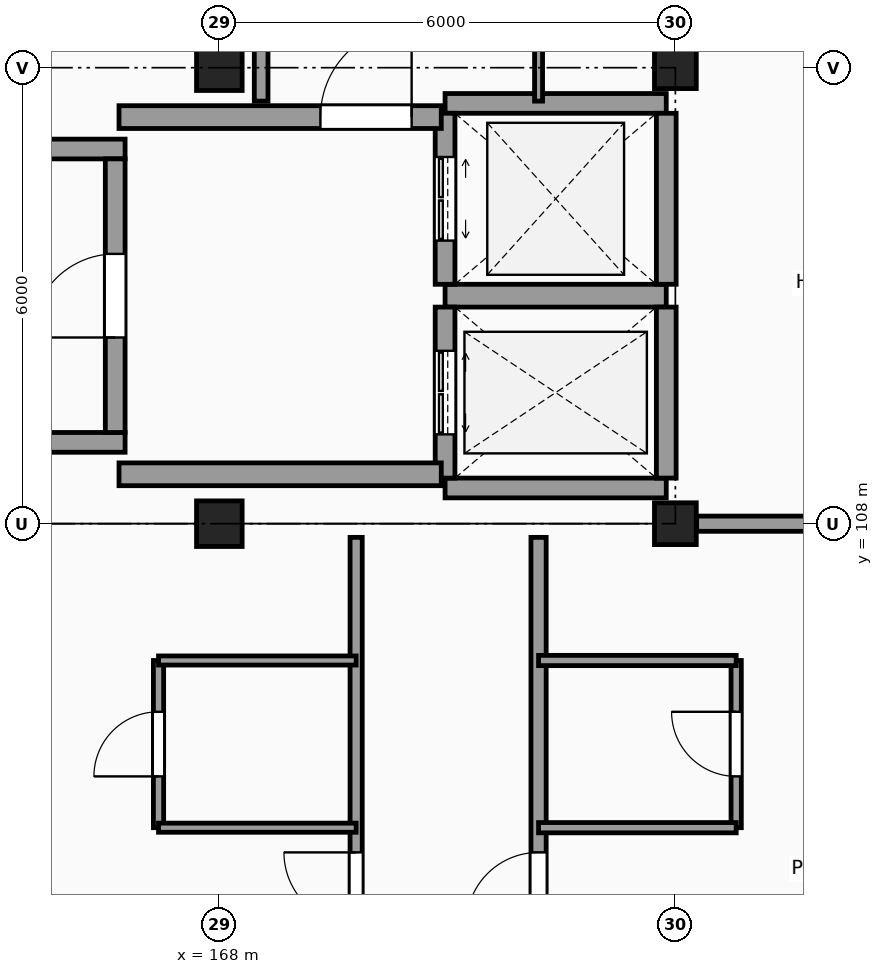
"""IFC4 building model, lengths in metres.
Left out: names, types, materials, properties, quantities, classifications, styles, units other than length and angle.
Written with IfcOpenShell. Run it as: python <this file> out.ifc"""

import sys

from ifc_helpers import new_model, si_unit, direction, frame, frame_2d, origin, origin_2d, place, context, subcontext, project, spatial, rectangle, extrude, element, fill, save


model = new_model("IFC4")
c1 = context("Model", 3, precision=1e-05, world=origin(), true_north=direction((0.0, 1.0)))
c2 = subcontext(c1, "Body", "Model", "MODEL_VIEW")
j1 = project(units=[si_unit("LENGTHUNIT", "METRE"), si_unit("PLANEANGLEUNIT", "RADIAN")], contexts=[c1])
p1 = place(None, origin())
s1 = spatial("IfcSite", under=j1, at=p1, CompositionType="ELEMENT")
p2 = place(p1, origin())
s2 = spatial("IfcBuilding", under=s1, at=p2, CompositionType="ELEMENT")
p3 = place(p2, frame((0.0, 0.0, 28.2)))
s3 = spatial("IfcBuildingStorey", under=s2, at=p3, CompositionType="ELEMENT", Elevation=28.2)
for number, where, z_axis, x_axis in (
    (1, (168.0, 108.0, 0.0), (0.0, 0.0, 1.0), (1.0, 0.0, 0.0)),
    (2, (168.0, 114.0, 0.0), (0.0, 0.0, 1.0), (1.0, 0.0, 0.0)),
):
    element("IfcColumn", number, at=place(p3, frame(where, z_axis=z_axis, x_axis=x_axis)), inside=s3, PredefinedType="COLUMN", context=c2, shape_type="SweptSolid", body=[
        extrude(rectangle(XDim=0.6, YDim=0.6, at=origin_2d()), origin(), (0.0, 0.0, 1.0), 3.3),
    ])
for number, where, z_axis, x_axis in (
    (3, (174.0, 108.0, 0.0), (0.0, 0.0, 1.0), (1.0, 0.0, 0.0)),
    (4, (174.0, 114.0, 0.0), (0.0, 0.0, 1.0), (1.0, 0.0, 0.0)),
):
    element("IfcColumn", number, at=place(p3, frame(where, z_axis=z_axis, x_axis=x_axis)), inside=s3, PredefinedType="COLUMN", context=c2, shape_type="SweptSolid", body=[
        extrude(rectangle(XDim=0.55, YDim=0.55, at=origin_2d()), origin(), (0.0, 0.0, 1.0), 3.3),
    ])
for number, where, z_axis, x_axis in (
    (5, (156.04, 109.07, 0.0), (0.0, 0.0, 1.0), (1.0, 0.0, 0.0)),
    (6, (156.04, 112.93, 0.0), (0.0, 0.0, 1.0), (1.0, 0.0, 0.0)),
):
    element("IfcWall", number, at=place(p3, frame(where, z_axis=z_axis, x_axis=x_axis)), inside=s3, PredefinedType="SHEAR", context=c2, shape_type="SweptSolid", body=[
        extrude(rectangle(XDim=10.72, YDim=0.26, at=frame_2d((5.36, 0.0))), origin(), (0.0, 0.0, 1.0), 3.3),
    ])
p4 = place(p3, frame((166.63, 109.2, 0.0), z_axis=(0.0, 0.0, 1.0), x_axis=(0.0, 1.0, 0.0)))
e7 = element("IfcWall", 7, at=p4, inside=s3, PredefinedType="SHEAR", context=c2, shape_type="SweptSolid", body=[
    extrude(rectangle(XDim=3.6, YDim=0.26, at=frame_2d((1.8, 0.0))), origin(), (0.0, 0.0, 1.0), 3.3),
])
p5 = place(p4, frame((1.25, 0.0, 0.0)))
e8 = element("IfcOpeningElement", 8, at=p5, cuts=e7, PredefinedType="OPENING", context=c2, shape_type="SweptSolid", body=[
    extrude(rectangle(XDim=1.1, YDim=2.15, at=frame_2d((0.55, 1.075))), frame((0.0, 0.14, 0.0), z_axis=(0.0, -1.0, 0.0), x_axis=(1.0, 0.0, 0.0)), (0.0, 0.0, 1.0), 0.28),
])
p6 = place(p3, frame((170.97, 108.47, 0.0), z_axis=(0.0, 0.0, 1.0), x_axis=(1.0, 0.0, 0.0)))
e9 = element("IfcWall", 9, at=p6, inside=s3, PredefinedType="SHEAR", context=c2, shape_type="SweptSolid", body=[
    extrude(rectangle(XDim=2.91, YDim=0.26, at=frame_2d((1.455, 0.0))), origin(), (0.0, 0.0, 1.0), 3.3),
])
p7 = place(p3, frame((170.97, 111.0, 0.0), z_axis=(0.0, 0.0, 1.0), x_axis=(1.0, 0.0, 0.0)))
e10 = element("IfcWall", 10, at=p7, inside=s3, PredefinedType="SHEAR", context=c2, shape_type="SweptSolid", body=[
    extrude(rectangle(XDim=2.91, YDim=0.3, at=frame_2d((1.455, 0.0))), origin(), (0.0, 0.0, 1.0), 3.3),
])
p8 = place(p3, frame((173.88, 108.6, 0.0), z_axis=(0.0, 0.0, 1.0), x_axis=(0.0, 1.0, 0.0)))
e11 = element("IfcWall", 11, at=p8, inside=s3, PredefinedType="SHEAR", context=c2, shape_type="SweptSolid", body=[
    extrude(rectangle(XDim=2.25, YDim=0.26, at=frame_2d((1.125, 0.0))), origin(), (0.0, 0.0, 1.0), 3.3),
])
p9 = place(p3, frame((170.97, 108.6, 0.0), z_axis=(0.0, 0.0, 1.0), x_axis=(0.0, 1.0, 0.0)))
e12 = element("IfcWall", 12, at=p9, inside=s3, PredefinedType="SHEAR", context=c2, shape_type="SweptSolid", body=[
    extrude(rectangle(XDim=2.25, YDim=0.26, at=frame_2d((1.125, 0.0))), origin(), (0.0, 0.0, 1.0), 3.3),
])
p10 = place(p9, frame((0.575, 0.0, 0.0)))
e13 = element("IfcOpeningElement", 13, at=p10, cuts=e12, PredefinedType="OPENING", context=c2, shape_type="SweptSolid", body=[
    extrude(rectangle(XDim=1.1, YDim=2.2, at=frame_2d((0.55, 1.1))), frame((0.0, 0.14, 0.0), z_axis=(0.0, -1.0, 0.0), x_axis=(1.0, 0.0, 0.0)), (0.0, 0.0, 1.0), 0.28),
])
p11 = place(p3, frame((170.97, 113.53, 0.0), z_axis=(0.0, 0.0, 1.0), x_axis=(1.0, 0.0, 0.0)))
e14 = element("IfcWall", 14, at=p11, inside=s3, PredefinedType="SHEAR", context=c2, shape_type="SweptSolid", body=[
    extrude(rectangle(XDim=2.91, YDim=0.26, at=frame_2d((1.455, 0.0))), origin(), (0.0, 0.0, 1.0), 3.3),
])
p12 = place(p3, frame((173.88, 111.15, 0.0), z_axis=(0.0, 0.0, 1.0), x_axis=(0.0, 1.0, 0.0)))
e15 = element("IfcWall", 15, at=p12, inside=s3, PredefinedType="SHEAR", context=c2, shape_type="SweptSolid", body=[
    extrude(rectangle(XDim=2.25, YDim=0.26, at=frame_2d((1.125, 0.0))), origin(), (0.0, 0.0, 1.0), 3.3),
])
p13 = place(p3, frame((170.97, 111.15, 0.0), z_axis=(0.0, 0.0, 1.0), x_axis=(0.0, 1.0, 0.0)))
e16 = element("IfcWall", 16, at=p13, inside=s3, PredefinedType="SHEAR", context=c2, shape_type="SweptSolid", body=[
    extrude(rectangle(XDim=2.25, YDim=0.26, at=frame_2d((1.125, 0.0))), origin(), (0.0, 0.0, 1.0), 3.3),
])
p14 = place(p13, frame((0.575, 0.0, 0.0)))
e17 = element("IfcOpeningElement", 17, at=p14, cuts=e16, PredefinedType="OPENING", context=c2, shape_type="SweptSolid", body=[
    extrude(rectangle(XDim=1.1, YDim=2.2, at=frame_2d((0.55, 1.1))), frame((0.0, 0.14, 0.0), z_axis=(0.0, -1.0, 0.0), x_axis=(1.0, 0.0, 0.0)), (0.0, 0.0, 1.0), 0.28),
])
p15 = place(p3, frame((166.68, 113.35, 0.0), z_axis=(0.0, 0.0, 1.0), x_axis=(1.0, 0.0, 0.0)))
e18 = element("IfcWall", 18, at=p15, inside=s3, PredefinedType="SHEAR", context=c2, shape_type="SweptSolid", body=[
    extrude(rectangle(XDim=4.24, YDim=0.3, at=frame_2d((2.12, 0.0))), origin(), (0.0, 0.0, 1.0), 3.3),
])
p16 = place(p15, frame((2.65, 0.0, 0.0)))
e19 = element("IfcOpeningElement", 19, at=p16, cuts=e18, PredefinedType="OPENING", context=c2, shape_type="SweptSolid", body=[
    extrude(rectangle(XDim=1.2, YDim=2.2, at=frame_2d((0.6, 1.1))), frame((0.0, 0.16, 0.0), z_axis=(0.0, -1.0, 0.0), x_axis=(1.0, 0.0, 0.0)), (0.0, 0.0, 1.0), 0.32),
])
p17 = place(p3, frame((166.68, 108.65, 0.0), z_axis=(0.0, 0.0, 1.0), x_axis=(1.0, 0.0, 0.0)))
e20 = element("IfcWall", 20, at=p17, inside=s3, PredefinedType="SHEAR", context=c2, shape_type="SweptSolid", body=[
    extrude(rectangle(XDim=4.24, YDim=0.3, at=frame_2d((2.12, 0.0))), origin(), (0.0, 0.0, 1.0), 3.3),
])
p18 = place(p3, frame((167.2, 104.0, 0.0), z_axis=(0.0, 0.0, 1.0), x_axis=(0.0, 1.0, 0.0)))
e21 = element("IfcWall", 21, at=p18, inside=s3, PredefinedType="PARTITIONING", context=c2, shape_type="SweptSolid", body=[
    extrude(rectangle(XDim=2.2, YDim=0.135, at=frame_2d((1.1, 0.0))), origin(), (0.0, 0.0, 1.0), 3.08),
])
p19 = place(p18, frame((0.675, 0.0, 0.0)))
e22 = element("IfcOpeningElement", 22, at=p19, cuts=e21, PredefinedType="OPENING", context=c2, shape_type="SweptSolid", body=[
    extrude(rectangle(XDim=0.85, YDim=2.1, at=frame_2d((0.425, 1.05))), frame((0.0, 0.078, 0.0), z_axis=(0.0, -1.0, 0.0), x_axis=(1.0, 0.0, 0.0)), (0.0, 0.0, 1.0), 0.155),
])
p20 = place(p3, frame((168.55, 113.56, 0.0), z_axis=(0.0, 0.0, 1.0), x_axis=(0.0, 1.0, 0.0)))
e23 = element("IfcWall", 23, at=p20, inside=s3, PredefinedType="PARTITIONING", context=c2, shape_type="SweptSolid", body=[
    extrude(rectangle(XDim=2.24, YDim=0.18, at=frame_2d((1.12, 0.0))), origin(), (0.0, 0.0, 1.0), 3.08),
])
p21 = place(p3, frame((169.8, 42.275, 0.0), z_axis=(0.0, 0.0, 1.0), x_axis=(0.0, 1.0, 0.0)))
e24 = element("IfcWall", 24, at=p21, inside=s3, PredefinedType="PARTITIONING", context=c2, shape_type="SweptSolid", body=[
    extrude(rectangle(XDim=65.545, YDim=0.16, at=frame_2d((32.772, 0.0))), origin(), (0.0, 0.0, 1.0), 3.08),
])
p22 = place(p21, frame((50.125, 0.0, 0.0)))
e25 = element("IfcOpeningElement", 25, at=p22, cuts=e24, PredefinedType="OPENING", context=c2, shape_type="SweptSolid", body=[
    extrude(rectangle(XDim=1.2, YDim=2.2, at=frame_2d((0.6, 1.1))), frame((0.0, 0.09, 0.0), z_axis=(0.0, -1.0, 0.0), x_axis=(1.0, 0.0, 0.0)), (0.0, 0.0, 1.0), 0.18),
])
p23 = place(p21, frame((0.4, 0.0, 0.0)))
e26 = element("IfcOpeningElement", 26, at=p23, cuts=e24, PredefinedType="OPENING", context=c2, shape_type="SweptSolid", body=[
    extrude(rectangle(XDim=0.95, YDim=2.1, at=frame_2d((0.475, 1.05))), frame((0.0, 0.09, 0.0), z_axis=(0.0, -1.0, 0.0), x_axis=(1.0, 0.0, 0.0)), (0.0, 0.0, 1.0), 0.18),
])
p24 = place(p21, frame((6.45, 0.0, 0.0)))
e27 = element("IfcOpeningElement", 27, at=p24, cuts=e24, PredefinedType="OPENING", context=c2, shape_type="SweptSolid", body=[
    extrude(rectangle(XDim=0.95, YDim=2.1, at=frame_2d((0.475, 1.05))), frame((0.0, 0.09, 0.0), z_axis=(0.0, -1.0, 0.0), x_axis=(1.0, 0.0, 0.0)), (0.0, 0.0, 1.0), 0.18),
])
p25 = place(p21, frame((12.45, 0.0, 0.0)))
e28 = element("IfcOpeningElement", 28, at=p25, cuts=e24, PredefinedType="OPENING", context=c2, shape_type="SweptSolid", body=[
    extrude(rectangle(XDim=0.95, YDim=2.1, at=frame_2d((0.475, 1.05))), frame((0.0, 0.09, 0.0), z_axis=(0.0, -1.0, 0.0), x_axis=(1.0, 0.0, 0.0)), (0.0, 0.0, 1.0), 0.18),
])
p26 = place(p21, frame((18.45, 0.0, 0.0)))
e29 = element("IfcOpeningElement", 29, at=p26, cuts=e24, PredefinedType="OPENING", context=c2, shape_type="SweptSolid", body=[
    extrude(rectangle(XDim=0.95, YDim=2.1, at=frame_2d((0.475, 1.05))), frame((0.0, 0.09, 0.0), z_axis=(0.0, -1.0, 0.0), x_axis=(1.0, 0.0, 0.0)), (0.0, 0.0, 1.0), 0.18),
])
p27 = place(p21, frame((24.45, 0.0, 0.0)))
e30 = element("IfcOpeningElement", 30, at=p27, cuts=e24, PredefinedType="OPENING", context=c2, shape_type="SweptSolid", body=[
    extrude(rectangle(XDim=0.95, YDim=2.1, at=frame_2d((0.475, 1.05))), frame((0.0, 0.09, 0.0), z_axis=(0.0, -1.0, 0.0), x_axis=(1.0, 0.0, 0.0)), (0.0, 0.0, 1.0), 0.18),
])
p28 = place(p21, frame((30.45, 0.0, 0.0)))
e31 = element("IfcOpeningElement", 31, at=p28, cuts=e24, PredefinedType="OPENING", context=c2, shape_type="SweptSolid", body=[
    extrude(rectangle(XDim=0.95, YDim=2.1, at=frame_2d((0.475, 1.05))), frame((0.0, 0.09, 0.0), z_axis=(0.0, -1.0, 0.0), x_axis=(1.0, 0.0, 0.0)), (0.0, 0.0, 1.0), 0.18),
])
p29 = place(p21, frame((54.45, 0.0, 0.0)))
e32 = element("IfcOpeningElement", 32, at=p29, cuts=e24, PredefinedType="OPENING", context=c2, shape_type="SweptSolid", body=[
    extrude(rectangle(XDim=0.95, YDim=2.1, at=frame_2d((0.475, 1.05))), frame((0.0, 0.09, 0.0), z_axis=(0.0, -1.0, 0.0), x_axis=(1.0, 0.0, 0.0)), (0.0, 0.0, 1.0), 0.18),
])
p30 = place(p21, frame((60.45, 0.0, 0.0)))
e33 = element("IfcOpeningElement", 33, at=p30, cuts=e24, PredefinedType="OPENING", context=c2, shape_type="SweptSolid", body=[
    extrude(rectangle(XDim=0.95, YDim=2.1, at=frame_2d((0.475, 1.05))), frame((0.0, 0.09, 0.0), z_axis=(0.0, -1.0, 0.0), x_axis=(1.0, 0.0, 0.0)), (0.0, 0.0, 1.0), 0.18),
])
p31 = place(p3, frame((172.2, 42.275, 0.0), z_axis=(0.0, 0.0, 1.0), x_axis=(0.0, 1.0, 0.0)))
e34 = element("IfcWall", 34, at=p31, inside=s3, PredefinedType="PARTITIONING", context=c2, shape_type="SweptSolid", body=[
    extrude(rectangle(XDim=65.545, YDim=0.2, at=frame_2d((32.772, 0.0))), origin(), (0.0, 0.0, 1.0), 3.08),
])
p32 = place(p31, frame((0.4, 0.0, 0.0)))
e35 = element("IfcOpeningElement", 35, at=p32, cuts=e34, PredefinedType="OPENING", context=c2, shape_type="SweptSolid", body=[
    extrude(rectangle(XDim=0.95, YDim=2.1, at=frame_2d((0.475, 1.05))), frame((0.0, 0.11, 0.0), z_axis=(0.0, -1.0, 0.0), x_axis=(1.0, 0.0, 0.0)), (0.0, 0.0, 1.0), 0.22),
])
p33 = place(p31, frame((4.85, 0.0, 0.0)))
e36 = element("IfcOpeningElement", 36, at=p33, cuts=e34, PredefinedType="OPENING", context=c2, shape_type="SweptSolid", body=[
    extrude(rectangle(XDim=0.95, YDim=2.1, at=frame_2d((0.475, 1.05))), frame((0.0, 0.11, 0.0), z_axis=(0.0, -1.0, 0.0), x_axis=(1.0, 0.0, 0.0)), (0.0, 0.0, 1.0), 0.22),
])
p34 = place(p31, frame((9.35, 0.0, 0.0)))
e37 = element("IfcOpeningElement", 37, at=p34, cuts=e34, PredefinedType="OPENING", context=c2, shape_type="SweptSolid", body=[
    extrude(rectangle(XDim=0.95, YDim=2.1, at=frame_2d((0.475, 1.05))), frame((0.0, 0.11, 0.0), z_axis=(0.0, -1.0, 0.0), x_axis=(1.0, 0.0, 0.0)), (0.0, 0.0, 1.0), 0.22),
])
p35 = place(p31, frame((18.45, 0.0, 0.0)))
e38 = element("IfcOpeningElement", 38, at=p35, cuts=e34, PredefinedType="OPENING", context=c2, shape_type="SweptSolid", body=[
    extrude(rectangle(XDim=0.95, YDim=2.1, at=frame_2d((0.475, 1.05))), frame((0.0, 0.11, 0.0), z_axis=(0.0, -1.0, 0.0), x_axis=(1.0, 0.0, 0.0)), (0.0, 0.0, 1.0), 0.22),
])
p36 = place(p31, frame((22.85, 0.0, 0.0)))
e39 = element("IfcOpeningElement", 39, at=p36, cuts=e34, PredefinedType="OPENING", context=c2, shape_type="SweptSolid", body=[
    extrude(rectangle(XDim=0.95, YDim=2.1, at=frame_2d((0.475, 1.05))), frame((0.0, 0.11, 0.0), z_axis=(0.0, -1.0, 0.0), x_axis=(1.0, 0.0, 0.0)), (0.0, 0.0, 1.0), 0.22),
])
p37 = place(p31, frame((30.05, 0.0, 0.0)))
e40 = element("IfcOpeningElement", 40, at=p37, cuts=e34, PredefinedType="OPENING", context=c2, shape_type="SweptSolid", body=[
    extrude(rectangle(XDim=0.95, YDim=2.1, at=frame_2d((0.475, 1.05))), frame((0.0, 0.11, 0.0), z_axis=(0.0, -1.0, 0.0), x_axis=(1.0, 0.0, 0.0)), (0.0, 0.0, 1.0), 0.22),
])
p38 = place(p31, frame((38.3, 0.0, 0.0)))
e41 = element("IfcOpeningElement", 41, at=p38, cuts=e34, PredefinedType="OPENING", context=c2, shape_type="SweptSolid", body=[
    extrude(rectangle(XDim=0.95, YDim=2.1, at=frame_2d((0.475, 1.05))), frame((0.0, 0.11, 0.0), z_axis=(0.0, -1.0, 0.0), x_axis=(1.0, 0.0, 0.0)), (0.0, 0.0, 1.0), 0.22),
])
p39 = place(p31, frame((40.85, 0.0, 0.0)))
e42 = element("IfcOpeningElement", 42, at=p39, cuts=e34, PredefinedType="OPENING", context=c2, shape_type="SweptSolid", body=[
    extrude(rectangle(XDim=0.95, YDim=2.1, at=frame_2d((0.475, 1.05))), frame((0.0, 0.11, 0.0), z_axis=(0.0, -1.0, 0.0), x_axis=(1.0, 0.0, 0.0)), (0.0, 0.0, 1.0), 0.22),
])
p40 = place(p31, frame((48.05, 0.0, 0.0)))
e43 = element("IfcOpeningElement", 43, at=p40, cuts=e34, PredefinedType="OPENING", context=c2, shape_type="SweptSolid", body=[
    extrude(rectangle(XDim=0.95, YDim=2.1, at=frame_2d((0.475, 1.05))), frame((0.0, 0.11, 0.0), z_axis=(0.0, -1.0, 0.0), x_axis=(1.0, 0.0, 0.0)), (0.0, 0.0, 1.0), 0.22),
])
p41 = place(p31, frame((52.25, 0.0, 0.0)))
e44 = element("IfcOpeningElement", 44, at=p41, cuts=e34, PredefinedType="OPENING", context=c2, shape_type="SweptSolid", body=[
    extrude(rectangle(XDim=0.95, YDim=2.1, at=frame_2d((0.475, 1.05))), frame((0.0, 0.11, 0.0), z_axis=(0.0, -1.0, 0.0), x_axis=(1.0, 0.0, 0.0)), (0.0, 0.0, 1.0), 0.22),
])
p42 = place(p31, frame((54.45, 0.0, 0.0)))
e45 = element("IfcOpeningElement", 45, at=p42, cuts=e34, PredefinedType="OPENING", context=c2, shape_type="SweptSolid", body=[
    extrude(rectangle(XDim=0.95, YDim=2.1, at=frame_2d((0.475, 1.05))), frame((0.0, 0.11, 0.0), z_axis=(0.0, -1.0, 0.0), x_axis=(1.0, 0.0, 0.0)), (0.0, 0.0, 1.0), 0.22),
])
p43 = place(p31, frame((60.45, 0.0, 0.0)))
e46 = element("IfcOpeningElement", 46, at=p43, cuts=e34, PredefinedType="OPENING", context=c2, shape_type="SweptSolid", body=[
    extrude(rectangle(XDim=0.95, YDim=2.1, at=frame_2d((0.475, 1.05))), frame((0.0, 0.11, 0.0), z_axis=(0.0, -1.0, 0.0), x_axis=(1.0, 0.0, 0.0)), (0.0, 0.0, 1.0), 0.22),
])
p44 = place(p3, frame((172.2, 113.56, 0.0), z_axis=(0.0, 0.0, 1.0), x_axis=(0.0, 1.0, 0.0)))
e47 = element("IfcWall", 47, at=p44, inside=s3, PredefinedType="PARTITIONING", context=c2, shape_type="SweptSolid", body=[
    extrude(rectangle(XDim=2.24, YDim=0.105, at=frame_2d((1.12, 0.0))), origin(), (0.0, 0.0, 1.0), 3.08),
])
p45 = place(p3, frame((174.8, 104.0, 0.0), z_axis=(0.0, 0.0, 1.0), x_axis=(0.0, 1.0, 0.0)))
e48 = element("IfcWall", 48, at=p45, inside=s3, PredefinedType="PARTITIONING", context=c2, shape_type="SweptSolid", body=[
    extrude(rectangle(XDim=2.2, YDim=0.135, at=frame_2d((1.1, 0.0))), origin(), (0.0, 0.0, 1.0), 3.08),
])
p46 = place(p45, frame((0.675, 0.0, 0.0)))
e49 = element("IfcOpeningElement", 49, at=p46, cuts=e48, PredefinedType="OPENING", context=c2, shape_type="SweptSolid", body=[
    extrude(rectangle(XDim=0.85, YDim=2.1, at=frame_2d((0.425, 1.05))), frame((0.0, 0.078, 0.0), z_axis=(0.0, -1.0, 0.0), x_axis=(1.0, 0.0, 0.0)), (0.0, 0.0, 1.0), 0.155),
])
p47 = place(p3, frame((167.2, 104.0, 0.0), z_axis=(0.0, 0.0, 1.0), x_axis=(1.0, 0.0, 0.0)))
e50 = element("IfcWall", 50, at=p47, inside=s3, PredefinedType="PARTITIONING", context=c2, shape_type="SweptSolid", body=[
    extrude(rectangle(XDim=2.6, YDim=0.12, at=frame_2d((1.3, 0.0))), origin(), (0.0, 0.0, 1.0), 3.08),
])
p48 = place(p3, frame((172.2, 104.0, 0.0), z_axis=(0.0, 0.0, 1.0), x_axis=(1.0, 0.0, 0.0)))
e51 = element("IfcWall", 51, at=p48, inside=s3, PredefinedType="PARTITIONING", context=c2, shape_type="SweptSolid", body=[
    extrude(rectangle(XDim=2.6, YDim=0.135, at=frame_2d((1.3, 0.0))), origin(), (0.0, 0.0, 1.0), 3.08),
])
p49 = place(p3, frame((167.2, 106.2, 0.0), z_axis=(0.0, 0.0, 1.0), x_axis=(1.0, 0.0, 0.0)))
e52 = element("IfcWall", 52, at=p49, inside=s3, PredefinedType="PARTITIONING", context=c2, shape_type="SweptSolid", body=[
    extrude(rectangle(XDim=2.6, YDim=0.12, at=frame_2d((1.3, 0.0))), origin(), (0.0, 0.0, 1.0), 3.08),
])
p50 = place(p3, frame((172.2, 106.2, 0.0), z_axis=(0.0, 0.0, 1.0), x_axis=(1.0, 0.0, 0.0)))
e53 = element("IfcWall", 53, at=p50, inside=s3, PredefinedType="PARTITIONING", context=c2, shape_type="SweptSolid", body=[
    extrude(rectangle(XDim=2.6, YDim=0.135, at=frame_2d((1.3, 0.0))), origin(), (0.0, 0.0, 1.0), 3.08),
])
p51 = place(p3, frame((174.28, 108.0, 0.0), z_axis=(0.0, 0.0, 1.0), x_axis=(1.0, 0.0, 0.0)))
e54 = element("IfcWall", 54, at=p51, inside=s3, PredefinedType="PARTITIONING", context=c2, shape_type="SweptSolid", body=[
    extrude(rectangle(XDim=5.415, YDim=0.2, at=frame_2d((2.708, 0.0))), origin(), (0.0, 0.0, 1.0), 2.38),
])
p52 = place(p5, origin())
e55 = element("IfcDoor", 55, at=p52, inside=s3, OperationType="SINGLE_SWING_LEFT", PredefinedType="DOOR", context=c2, shape_type="SweptSolid", body=[
    extrude(rectangle(XDim=1.1, YDim=2.15, at=frame_2d((0.55, 1.075))), frame((0.0, 0.025, 0.0), z_axis=(0.0, -1.0, 0.0), x_axis=(1.0, 0.0, 0.0)), (0.0, 0.0, 1.0), 0.05),
])
fill(e8, e55)
p53 = place(p10, origin())
e56 = element("IfcDoor", 56, at=p53, inside=s3, OperationType="DOUBLE_DOOR_SLIDING", PredefinedType="DOOR", context=c2, shape_type="SweptSolid", body=[
    extrude(rectangle(XDim=1.1, YDim=2.2, at=frame_2d((0.55, 1.1))), frame((0.0, 0.025, 0.0), z_axis=(0.0, -1.0, 0.0), x_axis=(1.0, 0.0, 0.0)), (0.0, 0.0, 1.0), 0.05),
])
fill(e13, e56)
p54 = place(p14, origin())
e57 = element("IfcDoor", 57, at=p54, inside=s3, OperationType="DOUBLE_DOOR_SLIDING", PredefinedType="DOOR", context=c2, shape_type="SweptSolid", body=[
    extrude(rectangle(XDim=1.1, YDim=2.2, at=frame_2d((0.55, 1.1))), frame((0.0, 0.025, 0.0), z_axis=(0.0, -1.0, 0.0), x_axis=(1.0, 0.0, 0.0)), (0.0, 0.0, 1.0), 0.05),
])
fill(e17, e57)
p55 = place(p16, origin())
e58 = element("IfcDoor", 58, at=p55, inside=s3, OperationType="SINGLE_SWING_RIGHT", PredefinedType="DOOR", context=c2, shape_type="SweptSolid", body=[
    extrude(rectangle(XDim=1.2, YDim=2.2, at=frame_2d((0.6, 1.1))), frame((0.0, 0.025, 0.0), z_axis=(0.0, -1.0, 0.0), x_axis=(1.0, 0.0, 0.0)), (0.0, 0.0, 1.0), 0.05),
])
fill(e19, e58)
p56 = place(p46, origin())
e59 = element("IfcDoor", 59, at=p56, inside=s3, OperationType="SINGLE_SWING_RIGHT", PredefinedType="DOOR", context=c2, shape_type="SweptSolid", body=[
    extrude(rectangle(XDim=0.85, YDim=2.1, at=frame_2d((0.425, 1.05))), frame((0.0, 0.025, 0.0), z_axis=(0.0, -1.0, 0.0), x_axis=(1.0, 0.0, 0.0)), (0.0, 0.0, 1.0), 0.05),
])
fill(e49, e59)
p57 = place(p43, origin())
e60 = element("IfcDoor", 60, at=p57, inside=s3, OperationType="SINGLE_SWING_LEFT", PredefinedType="DOOR", context=c2, shape_type="SweptSolid", body=[
    extrude(rectangle(XDim=0.95, YDim=2.1, at=frame_2d((0.475, 1.05))), frame((0.0, 0.025, 0.0), z_axis=(0.0, -1.0, 0.0), x_axis=(1.0, 0.0, 0.0)), (0.0, 0.0, 1.0), 0.05),
])
fill(e46, e60)
p58 = place(p19, origin())
e61 = element("IfcDoor", 61, at=p58, inside=s3, OperationType="SINGLE_SWING_LEFT", PredefinedType="DOOR", context=c2, shape_type="SweptSolid", body=[
    extrude(rectangle(XDim=0.85, YDim=2.1, at=frame_2d((0.425, 1.05))), frame((0.0, 0.025, 0.0), z_axis=(0.0, -1.0, 0.0), x_axis=(1.0, 0.0, 0.0)), (0.0, 0.0, 1.0), 0.05),
])
fill(e22, e61)
p59 = place(p30, origin())
e62 = element("IfcDoor", 62, at=p59, inside=s3, OperationType="SINGLE_SWING_RIGHT", PredefinedType="DOOR", context=c2, shape_type="SweptSolid", body=[
    extrude(rectangle(XDim=0.95, YDim=2.1, at=frame_2d((0.475, 1.05))), frame((0.0, 0.025, 0.0), z_axis=(0.0, -1.0, 0.0), x_axis=(1.0, 0.0, 0.0)), (0.0, 0.0, 1.0), 0.05),
])
fill(e33, e62)
save(model, sys.argv[1])
